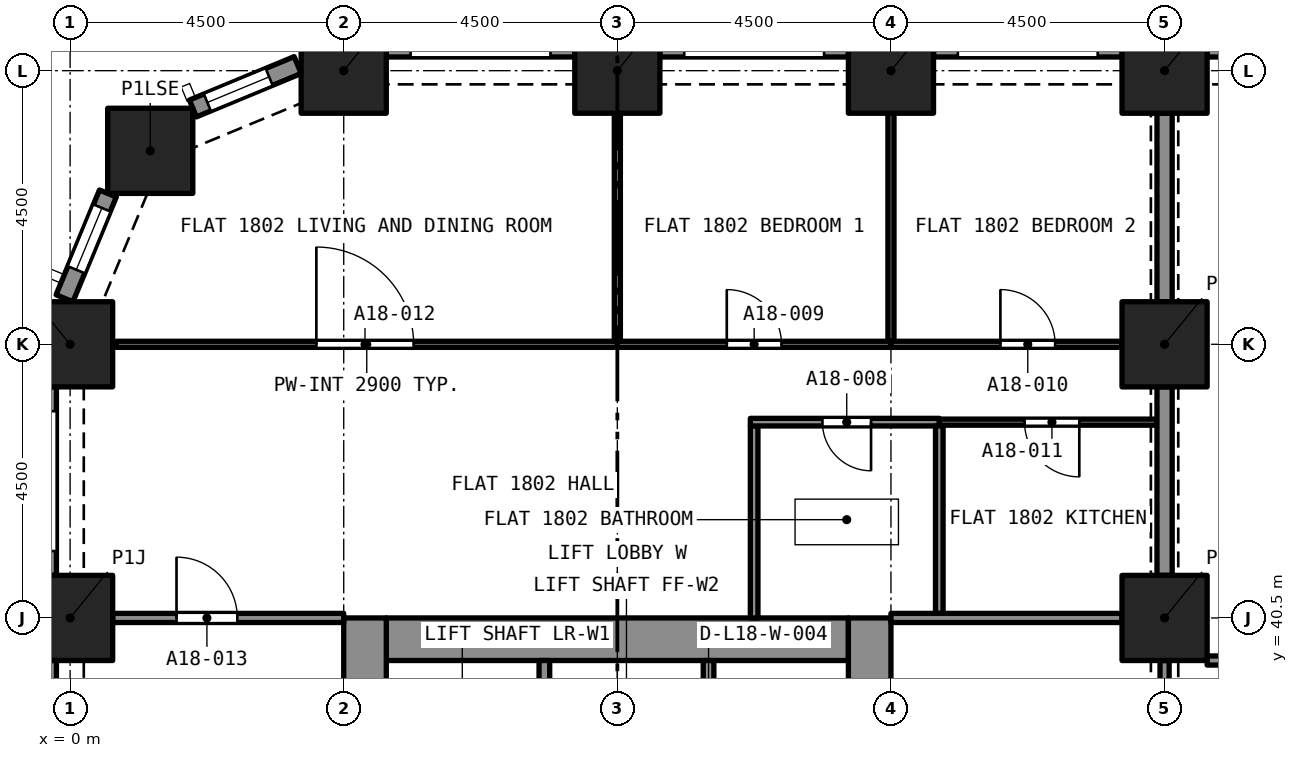
"""IFC4 building model, lengths in metres.
Left out: names, types, materials, properties, quantities, classifications, styles, units other than length and angle.
Written with IfcOpenShell. Run it as: python <this file> out.ifc"""

import sys

from ifc_helpers import new_model, si_unit, direction, frame, frame_2d, origin, origin_2d, place, context, subcontext, project, spatial, rectangle, extrude, element, fill, save


model = new_model("IFC4")
c1 = context("Model", 3, precision=1e-05, world=origin(), true_north=direction((0.0, 1.0)))
c2 = subcontext(c1, "Body", "Model", "MODEL_VIEW")
j1 = project(units=[si_unit("LENGTHUNIT", "METRE"), si_unit("PLANEANGLEUNIT", "RADIAN")], contexts=[c1])
p1 = place(None, origin())
s1 = spatial("IfcSite", under=j1, at=p1, CompositionType="ELEMENT")
p2 = place(p1, origin())
s2 = spatial("IfcBuilding", under=s1, at=p2, CompositionType="ELEMENT")
p3 = place(p2, frame((0.0, 0.0, 68.8)))
s3 = spatial("IfcBuildingStorey", under=s2, at=p3, CompositionType="ELEMENT", Elevation=68.8)
for number, where, z_axis, x_axis in (
    (1, (0.0, 40.5, 0.0), (0.0, 0.0, 1.0), (1.0, 0.0, 0.0)),
    (2, (18.0, 40.5, 0.0), (0.0, 0.0, 1.0), (1.0, 0.0, 0.0)),
    (3, (0.0, 45.0, 0.0), (0.0, 0.0, 1.0), (1.0, 0.0, 0.0)),
    (4, (18.0, 45.0, 0.0), (0.0, 0.0, 1.0), (1.0, 0.0, 0.0)),
    (5, (1.318, 48.182, 0.0), (0.0, 0.0, 1.0), (1.0, 0.0, 0.0)),
    (6, (4.5, 49.5, 0.0), (0.0, 0.0, 1.0), (1.0, 0.0, 0.0)),
    (7, (9.0, 49.5, 0.0), (0.0, 0.0, 1.0), (1.0, 0.0, 0.0)),
    (8, (13.5, 49.5, 0.0), (0.0, 0.0, 1.0), (1.0, 0.0, 0.0)),
    (9, (18.0, 49.5, 0.0), (0.0, 0.0, 1.0), (1.0, 0.0, 0.0)),
):
    element("IfcColumn", number, at=place(p3, frame(where, z_axis=z_axis, x_axis=x_axis)), inside=s3, PredefinedType="COLUMN", context=c2, shape_type="SweptSolid", body=[
        extrude(rectangle(XDim=1.4, YDim=1.4, at=origin_2d()), origin(), (0.0, 0.0, 1.0), 3.2),
    ])
p4 = place(p3, frame((5.2, 40.15, 0.0), z_axis=(0.0, 0.0, 1.0), x_axis=(1.0, 0.0, 0.0)))
e10 = element("IfcWall", 10, at=p4, inside=s3, PredefinedType="SOLIDWALL", context=c2, shape_type="SweptSolid", body=[
    extrude(rectangle(XDim=7.6, YDim=0.7, at=frame_2d((3.8, 0.0))), origin(), (0.0, 0.0, 1.0), 3.2),
])
p5 = place(p3, frame((4.85, 27.0, 0.0), z_axis=(0.0, 0.0, 1.0), x_axis=(0.0, 1.0, 0.0)))
e11 = element("IfcWall", 11, at=p5, inside=s3, PredefinedType="SOLIDWALL", context=c2, shape_type="SweptSolid", body=[
    extrude(rectangle(XDim=13.5, YDim=0.7, at=frame_2d((6.75, 0.0))), origin(), (0.0, 0.0, 1.0), 3.2),
])
p6 = place(p5, frame((8.95, 0.0, 0.0)))
e12 = element("IfcOpeningElement", 12, at=p6, cuts=e11, PredefinedType="OPENING", context=c2, shape_type="SweptSolid", body=[
    extrude(rectangle(XDim=1.2, YDim=2.1, at=frame_2d((0.6, 1.05))), frame((0.0, 0.36, 0.0), z_axis=(0.0, -1.0, 0.0), x_axis=(1.0, 0.0, 0.0)), (0.0, 0.0, 1.0), 0.72),
])
p7 = place(p3, frame((13.15, 27.0, 0.0), z_axis=(0.0, 0.0, 1.0), x_axis=(0.0, 1.0, 0.0)))
e13 = element("IfcWall", 13, at=p7, inside=s3, PredefinedType="SOLIDWALL", context=c2, shape_type="SweptSolid", body=[
    extrude(rectangle(XDim=13.5, YDim=0.7, at=frame_2d((6.75, 0.0))), origin(), (0.0, 0.0, 1.0), 3.2),
])
p8 = place(p7, frame((11.1, 0.0, 0.0)))
e14 = element("IfcOpeningElement", 14, at=p8, cuts=e13, PredefinedType="OPENING", context=c2, shape_type="SweptSolid", body=[
    extrude(rectangle(XDim=1.1, YDim=2.1, at=frame_2d((0.55, 1.05))), frame((0.0, 0.36, 0.0), z_axis=(0.0, -1.0, 0.0), x_axis=(1.0, 0.0, 0.0)), (0.0, 0.0, 1.0), 0.72),
])
p9 = place(p7, frame((8.95, 0.0, 0.0)))
e15 = element("IfcOpeningElement", 15, at=p9, cuts=e13, PredefinedType="OPENING", context=c2, shape_type="SweptSolid", body=[
    extrude(rectangle(XDim=1.2, YDim=2.1, at=frame_2d((0.6, 1.05))), frame((0.0, 0.36, 0.0), z_axis=(0.0, -1.0, 0.0), x_axis=(1.0, 0.0, 0.0)), (0.0, 0.0, 1.0), 0.72),
])
p10 = place(p3, frame((18.7, 49.875, 0.0), z_axis=(0.0, 0.0, 1.0), x_axis=(1.0, 0.0, 0.0)))
e16 = element("IfcWall", 16, at=p10, inside=s3, PredefinedType="SOLIDWALL", context=c2, shape_type="SweptSolid", body=[
    extrude(rectangle(XDim=3.1, YDim=0.3, at=frame_2d((1.55, 0.0))), origin(), (0.0, 0.0, 1.0), 3.2),
])
p11 = place(p10, frame((0.4, 0.0, 0.45)))
e17 = element("IfcOpeningElement", 17, at=p11, cuts=e16, PredefinedType="OPENING", context=c2, shape_type="SweptSolid", body=[
    extrude(rectangle(XDim=2.3, YDim=1.95, at=frame_2d((1.15, 0.975))), frame((0.0, 0.16, 0.0), z_axis=(0.0, -1.0, 0.0), x_axis=(1.0, 0.0, 0.0)), (0.0, 0.0, 1.0), 0.32),
])
p12 = place(p3, frame((14.2, 49.875, 0.0), z_axis=(0.0, 0.0, 1.0), x_axis=(1.0, 0.0, 0.0)))
e18 = element("IfcWall", 18, at=p12, inside=s3, PredefinedType="SOLIDWALL", context=c2, shape_type="SweptSolid", body=[
    extrude(rectangle(XDim=3.1, YDim=0.3, at=frame_2d((1.55, 0.0))), origin(), (0.0, 0.0, 1.0), 3.2),
])
p13 = place(p12, frame((0.4, 0.0, 0.45)))
e19 = element("IfcOpeningElement", 19, at=p13, cuts=e18, PredefinedType="OPENING", context=c2, shape_type="SweptSolid", body=[
    extrude(rectangle(XDim=2.3, YDim=1.95, at=frame_2d((1.15, 0.975))), frame((0.0, 0.16, 0.0), z_axis=(0.0, -1.0, 0.0), x_axis=(1.0, 0.0, 0.0)), (0.0, 0.0, 1.0), 0.32),
])
p14 = place(p3, frame((9.7, 49.875, 0.0), z_axis=(0.0, 0.0, 1.0), x_axis=(1.0, 0.0, 0.0)))
e20 = element("IfcWall", 20, at=p14, inside=s3, PredefinedType="SOLIDWALL", context=c2, shape_type="SweptSolid", body=[
    extrude(rectangle(XDim=3.1, YDim=0.3, at=frame_2d((1.55, 0.0))), origin(), (0.0, 0.0, 1.0), 3.2),
])
p15 = place(p14, frame((0.4, 0.0, 0.45)))
e21 = element("IfcOpeningElement", 21, at=p15, cuts=e20, PredefinedType="OPENING", context=c2, shape_type="SweptSolid", body=[
    extrude(rectangle(XDim=2.3, YDim=1.95, at=frame_2d((1.15, 0.975))), frame((0.0, 0.16, 0.0), z_axis=(0.0, -1.0, 0.0), x_axis=(1.0, 0.0, 0.0)), (0.0, 0.0, 1.0), 0.32),
])
p16 = place(p3, frame((5.2, 49.875, 0.0), z_axis=(0.0, 0.0, 1.0), x_axis=(1.0, 0.0, 0.0)))
e22 = element("IfcWall", 22, at=p16, inside=s3, PredefinedType="SOLIDWALL", context=c2, shape_type="SweptSolid", body=[
    extrude(rectangle(XDim=3.1, YDim=0.3, at=frame_2d((1.55, 0.0))), origin(), (0.0, 0.0, 1.0), 3.2),
])
p17 = place(p16, frame((0.4, 0.0, 0.45)))
e23 = element("IfcOpeningElement", 23, at=p17, cuts=e22, PredefinedType="OPENING", context=c2, shape_type="SweptSolid", body=[
    extrude(rectangle(XDim=2.3, YDim=1.95, at=frame_2d((1.15, 0.975))), frame((0.0, 0.16, 0.0), z_axis=(0.0, -1.0, 0.0), x_axis=(1.0, 0.0, 0.0)), (0.0, 0.0, 1.0), 0.32),
])
p18 = place(p3, frame((2.02, 48.878, 0.0), z_axis=(0.0, 0.0, 1.0), x_axis=(0.923903565336, 0.38262540684, 0.0)))
e24 = element("IfcWall", 24, at=p18, inside=s3, PredefinedType="SOLIDWALL", context=c2, shape_type="SweptSolid", body=[
    extrude(rectangle(XDim=1.865, YDim=0.3, at=frame_2d((0.933, 0.0))), origin(), (0.0, 0.0, 1.0), 3.2),
])
p19 = place(p18, frame((0.258, 0.0, 0.45)))
e25 = element("IfcOpeningElement", 25, at=p19, cuts=e24, PredefinedType="OPENING", context=c2, shape_type="SweptSolid", body=[
    extrude(rectangle(XDim=1.1, YDim=1.95, at=frame_2d((0.55, 0.975))), frame((0.0, 0.16, 0.0), z_axis=(0.0, -1.0, 0.0), x_axis=(1.0, 0.0, 0.0)), (0.0, 0.0, 1.0), 0.32),
])
p20 = place(p3, frame((-0.092, 45.757, 0.0), z_axis=(0.0, 0.0, 1.0), x_axis=(0.382737135771, 0.923857286003, 0.0)))
e26 = element("IfcWall", 26, at=p20, inside=s3, PredefinedType="SOLIDWALL", context=c2, shape_type="SweptSolid", body=[
    extrude(rectangle(XDim=1.865, YDim=0.3, at=frame_2d((0.933, 0.0))), origin(), (0.0, 0.0, 1.0), 3.2),
])
p21 = place(p20, frame((0.508, 0.0, 0.45)))
e27 = element("IfcOpeningElement", 27, at=p21, cuts=e26, PredefinedType="OPENING", context=c2, shape_type="SweptSolid", body=[
    extrude(rectangle(XDim=1.1, YDim=1.95, at=frame_2d((0.55, 0.975))), frame((0.0, 0.16, 0.0), z_axis=(0.0, -1.0, 0.0), x_axis=(1.0, 0.0, 0.0)), (0.0, 0.0, 1.0), 0.32),
])
p22 = place(p3, frame((-0.375, 41.2, 0.0), z_axis=(0.0, 0.0, 1.0), x_axis=(0.0, 1.0, 0.0)))
e28 = element("IfcWall", 28, at=p22, inside=s3, PredefinedType="SOLIDWALL", context=c2, shape_type="SweptSolid", body=[
    extrude(rectangle(XDim=3.1, YDim=0.3, at=frame_2d((1.55, 0.0))), origin(), (0.0, 0.0, 1.0), 3.2),
])
p23 = place(p22, frame((0.4, 0.0, 0.45)))
e29 = element("IfcOpeningElement", 29, at=p23, cuts=e28, PredefinedType="OPENING", context=c2, shape_type="SweptSolid", body=[
    extrude(rectangle(XDim=2.3, YDim=1.95, at=frame_2d((1.15, 0.975))), frame((0.0, 0.16, 0.0), z_axis=(0.0, -1.0, 0.0), x_axis=(1.0, 0.0, 0.0)), (0.0, 0.0, 1.0), 0.32),
])
p24 = place(p3, frame((-0.375, 36.7, 0.0), z_axis=(0.0, 0.0, 1.0), x_axis=(0.0, 1.0, 0.0)))
e30 = element("IfcWall", 30, at=p24, inside=s3, PredefinedType="SOLIDWALL", context=c2, shape_type="SweptSolid", body=[
    extrude(rectangle(XDim=3.1, YDim=0.3, at=frame_2d((1.55, 0.0))), origin(), (0.0, 0.0, 1.0), 3.2),
])
p25 = place(p24, frame((0.4, 0.0, 0.45)))
e31 = element("IfcOpeningElement", 31, at=p25, cuts=e30, PredefinedType="OPENING", context=c2, shape_type="SweptSolid", body=[
    extrude(rectangle(XDim=2.3, YDim=1.95, at=frame_2d((1.15, 0.975))), frame((0.0, 0.16, 0.0), z_axis=(0.0, -1.0, 0.0), x_axis=(1.0, 0.0, 0.0)), (0.0, 0.0, 1.0), 0.32),
])
p26 = place(p3, frame((11.25, 40.5, 0.0), z_axis=(0.0, 0.0, 1.0), x_axis=(0.0, 1.0, 0.0)))
e32 = element("IfcWall", 32, at=p26, inside=s3, PredefinedType="PARTITIONING", context=c2, shape_type="SweptSolid", body=[
    extrude(rectangle(XDim=3.157, YDim=0.125, at=frame_2d((1.579, 0.0))), origin(), (0.0, 0.0, 1.0), 2.9),
])
p27 = place(p3, frame((14.295, 43.72, 0.0), z_axis=(0.0, 0.0, 1.0), x_axis=(-1.0, 0.0, 0.0)))
e33 = element("IfcWall", 33, at=p27, inside=s3, PredefinedType="PARTITIONING", context=c2, shape_type="SweptSolid", body=[
    extrude(rectangle(XDim=3.108, YDim=0.125, at=frame_2d((1.554, 0.0))), origin(), (0.0, 0.0, 1.0), 2.9),
])
p28 = place(p27, frame((1.123, 0.0, 0.0)))
e34 = element("IfcOpeningElement", 34, at=p28, cuts=e33, PredefinedType="OPENING", context=c2, shape_type="SweptSolid", body=[
    extrude(rectangle(XDim=0.8, YDim=2.1, at=frame_2d((0.4, 1.05))), frame((0.0, 0.073, 0.0), z_axis=(0.0, -1.0, 0.0), x_axis=(1.0, 0.0, 0.0)), (0.0, 0.0, 1.0), 0.145),
])
p29 = place(p3, frame((14.295, 40.575, 0.0), z_axis=(0.0, 0.0, 1.0), x_axis=(0.0, 1.0, 0.0)))
e35 = element("IfcWall", 35, at=p29, inside=s3, PredefinedType="PARTITIONING", context=c2, shape_type="SweptSolid", body=[
    extrude(rectangle(XDim=3.083, YDim=0.125, at=frame_2d((1.541, 0.0))), origin(), (0.0, 0.0, 1.0), 2.9),
])
p30 = place(p3, frame((13.5, 40.5, 0.0), z_axis=(0.0, 0.0, 1.0), x_axis=(1.0, 0.0, 0.0)))
e36 = element("IfcWall", 36, at=p30, inside=s3, PredefinedType="PARTITIONING", context=c2, shape_type="SweptSolid", body=[
    extrude(rectangle(XDim=3.8, YDim=0.15, at=frame_2d((1.9, 0.0))), origin(), (0.0, 0.0, 1.0), 2.9),
])
p31 = place(p3, frame((13.5, 45.05, 0.0), z_axis=(0.0, 0.0, 1.0), x_axis=(0.0, 1.0, 0.0)))
e37 = element("IfcWall", 37, at=p31, inside=s3, PredefinedType="PARTITIONING", context=c2, shape_type="SweptSolid", body=[
    extrude(rectangle(XDim=3.75, YDim=0.1, at=frame_2d((1.875, 0.0))), origin(), (0.0, 0.0, 1.0), 2.9),
])
p32 = place(p3, frame((9.0, 45.0, 0.0), z_axis=(0.0, 0.0, 1.0), x_axis=(1.0, 0.0, 0.0)))
e38 = element("IfcWall", 38, at=p32, inside=s3, PredefinedType="PARTITIONING", context=c2, shape_type="SweptSolid", body=[
    extrude(rectangle(XDim=4.5, YDim=0.1, at=frame_2d((2.25, 0.0))), origin(), (0.0, 0.0, 1.0), 2.9),
])
p33 = place(p32, frame((1.8, 0.0, 0.0)))
e39 = element("IfcOpeningElement", 39, at=p33, cuts=e38, PredefinedType="OPENING", context=c2, shape_type="SweptSolid", body=[
    extrude(rectangle(XDim=0.9, YDim=2.1, at=frame_2d((0.45, 1.05))), frame((0.0, 0.06, 0.0), z_axis=(0.0, -1.0, 0.0), x_axis=(1.0, 0.0, 0.0)), (0.0, 0.0, 1.0), 0.12),
])
p34 = place(p3, frame((9.0, 45.05, 0.0), z_axis=(0.0, 0.0, 1.0), x_axis=(0.0, 1.0, 0.0)))
e40 = element("IfcWall", 40, at=p34, inside=s3, PredefinedType="PARTITIONING", context=c2, shape_type="SweptSolid", body=[
    extrude(rectangle(XDim=3.75, YDim=0.1, at=frame_2d((1.875, 0.0))), origin(), (0.0, 0.0, 1.0), 2.9),
])
p35 = place(p3, frame((13.5, 45.0, 0.0), z_axis=(0.0, 0.0, 1.0), x_axis=(1.0, 0.0, 0.0)))
e41 = element("IfcWall", 41, at=p35, inside=s3, PredefinedType="PARTITIONING", context=c2, shape_type="SweptSolid", body=[
    extrude(rectangle(XDim=3.8, YDim=0.1, at=frame_2d((1.9, 0.0))), origin(), (0.0, 0.0, 1.0), 2.9),
])
p36 = place(p35, frame((1.8, 0.0, 0.0)))
e42 = element("IfcOpeningElement", 42, at=p36, cuts=e41, PredefinedType="OPENING", context=c2, shape_type="SweptSolid", body=[
    extrude(rectangle(XDim=0.9, YDim=2.1, at=frame_2d((0.45, 1.05))), frame((0.0, 0.06, 0.0), z_axis=(0.0, -1.0, 0.0), x_axis=(1.0, 0.0, 0.0)), (0.0, 0.0, 1.0), 0.12),
])
p37 = place(p3, frame((18.0, 45.7, 0.0), z_axis=(0.0, 0.0, 1.0), x_axis=(0.0, 1.0, 0.0)))
e43 = element("IfcWall", 43, at=p37, inside=s3, PredefinedType="PARTITIONING", context=c2, shape_type="SweptSolid", body=[
    extrude(rectangle(XDim=3.1, YDim=0.25, at=frame_2d((1.55, 0.0))), origin(), (0.0, 0.0, 1.0), 2.38),
])
p38 = place(p3, frame((17.875, 43.72, 0.0), z_axis=(0.0, 0.0, 1.0), x_axis=(-1.0, 0.0, 0.0)))
e44 = element("IfcWall", 44, at=p38, inside=s3, PredefinedType="PARTITIONING", context=c2, shape_type="SweptSolid", body=[
    extrude(rectangle(XDim=3.58, YDim=0.1, at=frame_2d((1.79, 0.0))), origin(), (0.0, 0.0, 1.0), 2.9),
])
p39 = place(p38, frame((1.277, 0.0, 0.0)))
e45 = element("IfcOpeningElement", 45, at=p39, cuts=e44, PredefinedType="OPENING", context=c2, shape_type="SweptSolid", body=[
    extrude(rectangle(XDim=0.9, YDim=2.1, at=frame_2d((0.45, 1.05))), frame((0.0, 0.06, 0.0), z_axis=(0.0, -1.0, 0.0), x_axis=(1.0, 0.0, 0.0)), (0.0, 0.0, 1.0), 0.12),
])
p40 = place(p3, frame((0.758, 45.0, 0.0), z_axis=(0.0, 0.0, 1.0), x_axis=(1.0, 0.0, 0.0)))
e46 = element("IfcWall", 46, at=p40, inside=s3, PredefinedType="PARTITIONING", context=c2, shape_type="SweptSolid", body=[
    extrude(rectangle(XDim=8.242, YDim=0.1, at=frame_2d((4.121, 0.0))), origin(), (0.0, 0.0, 1.0), 2.9),
])
p41 = place(p40, frame((3.292, 0.0, 0.0)))
e47 = element("IfcOpeningElement", 47, at=p41, cuts=e46, PredefinedType="OPENING", context=c2, shape_type="SweptSolid", body=[
    extrude(rectangle(XDim=1.6, YDim=2.1, at=frame_2d((0.8, 1.05))), frame((0.0, 0.06, 0.0), z_axis=(0.0, -1.0, 0.0), x_axis=(1.0, 0.0, 0.0)), (0.0, 0.0, 1.0), 0.12),
])
p42 = place(p3, frame((0.7, 40.5, 0.0), z_axis=(0.0, 0.0, 1.0), x_axis=(1.0, 0.0, 0.0)))
e48 = element("IfcWall", 48, at=p42, inside=s3, PredefinedType="PARTITIONING", context=c2, shape_type="SweptSolid", body=[
    extrude(rectangle(XDim=3.8, YDim=0.15, at=frame_2d((1.9, 0.0))), origin(), (0.0, 0.0, 1.0), 2.9),
])
p43 = place(p42, frame((1.05, 0.0, 0.0)))
e49 = element("IfcOpeningElement", 49, at=p43, cuts=e48, PredefinedType="OPENING", context=c2, shape_type="SweptSolid", body=[
    extrude(rectangle(XDim=1.0, YDim=2.1, at=frame_2d((0.5, 1.05))), frame((0.0, 0.085, 0.0), z_axis=(0.0, -1.0, 0.0), x_axis=(1.0, 0.0, 0.0)), (0.0, 0.0, 1.0), 0.17),
])
p44 = place(p3, frame((18.0, 41.2, 0.0), z_axis=(0.0, 0.0, 1.0), x_axis=(0.0, 1.0, 0.0)))
e50 = element("IfcWall", 50, at=p44, inside=s3, PredefinedType="PARTITIONING", context=c2, shape_type="SweptSolid", body=[
    extrude(rectangle(XDim=3.1, YDim=0.25, at=frame_2d((1.55, 0.0))), origin(), (0.0, 0.0, 1.0), 2.38),
])
p45 = place(p3, frame((18.7, 39.8, 0.0), z_axis=(0.0, 0.0, 1.0), x_axis=(1.0, 0.0, 0.0)))
e51 = element("IfcWall", 51, at=p45, inside=s3, PredefinedType="PARTITIONING", context=c2, shape_type="SweptSolid", body=[
    extrude(rectangle(XDim=12.1, YDim=0.15, at=frame_2d((6.05, 0.0))), origin(), (0.0, 0.0, 1.0), 2.75),
])
p46 = place(p45, frame((5.55, 0.0, 0.0)))
e52 = element("IfcOpeningElement", 52, at=p46, cuts=e51, PredefinedType="OPENING", context=c2, shape_type="SweptSolid", body=[
    extrude(rectangle(XDim=1.0, YDim=2.1, at=frame_2d((0.5, 1.05))), frame((0.0, 0.085, 0.0), z_axis=(0.0, -1.0, 0.0), x_axis=(1.0, 0.0, 0.0)), (0.0, 0.0, 1.0), 0.17),
])
p47 = place(p3, frame((18.0, 39.8, 0.0), z_axis=(0.0, 0.0, 1.0), x_axis=(0.0, -1.0, 0.0)))
e53 = element("IfcWall", 53, at=p47, inside=s3, PredefinedType="PARTITIONING", context=c2, shape_type="SweptSolid", body=[
    extrude(rectangle(XDim=3.1, YDim=0.15, at=frame_2d((1.55, 0.0))), origin(), (0.0, 0.0, 1.0), 2.38),
])
p48 = place(p47, frame((0.95, 0.0, 0.0)))
e54 = element("IfcOpeningElement", 54, at=p48, cuts=e53, PredefinedType="OPENING", context=c2, shape_type="SweptSolid", body=[
    extrude(rectangle(XDim=1.2, YDim=2.1, at=frame_2d((0.6, 1.05))), frame((0.0, 0.085, 0.0), z_axis=(0.0, -1.0, 0.0), x_axis=(1.0, 0.0, 0.0)), (0.0, 0.0, 1.0), 0.17),
])
p49 = place(p3, frame((7.8, 37.5, 0.0), z_axis=(0.0, 0.0, 1.0), x_axis=(0.0, 1.0, 0.0)))
e55 = element("IfcWall", 55, at=p49, inside=s3, PredefinedType="SOLIDWALL", context=c2, shape_type="SweptSolid", body=[
    extrude(rectangle(XDim=2.3, YDim=0.175, at=frame_2d((1.15, 0.0))), origin(), (0.0, 0.0, 1.0), 2.9),
])
p50 = place(p3, frame((10.5, 37.5, 0.0), z_axis=(0.0, 0.0, 1.0), x_axis=(0.0, 1.0, 0.0)))
e56 = element("IfcWall", 56, at=p50, inside=s3, PredefinedType="SOLIDWALL", context=c2, shape_type="SweptSolid", body=[
    extrude(rectangle(XDim=2.3, YDim=0.175, at=frame_2d((1.15, 0.0))), origin(), (0.0, 0.0, 1.0), 2.9),
])
p51 = place(p50, frame((0.65, 0.0, 0.0)))
e57 = element("IfcOpeningElement", 57, at=p51, cuts=e56, PredefinedType="OPENING", context=c2, shape_type="SweptSolid", body=[
    extrude(rectangle(XDim=1.0, YDim=2.1, at=frame_2d((0.5, 1.05))), frame((0.0, 0.097, 0.0), z_axis=(0.0, -1.0, 0.0), x_axis=(1.0, 0.0, 0.0)), (0.0, 0.0, 1.0), 0.195),
])
p52 = place(p19, origin())
e58 = element("IfcWindow", 58, at=p52, inside=s3, PartitioningType="SINGLE_PANEL", PredefinedType="WINDOW", context=c2, shape_type="SweptSolid", body=[
    extrude(rectangle(XDim=1.1, YDim=1.95, at=frame_2d((0.55, 0.975))), frame((0.0, 0.03, 0.0), z_axis=(0.0, -1.0, 0.0), x_axis=(1.0, 0.0, 0.0)), (0.0, 0.0, 1.0), 0.06),
])
fill(e25, e58)
p53 = place(p21, origin())
e59 = element("IfcWindow", 59, at=p53, inside=s3, PartitioningType="SINGLE_PANEL", PredefinedType="WINDOW", context=c2, shape_type="SweptSolid", body=[
    extrude(rectangle(XDim=1.1, YDim=1.95, at=frame_2d((0.55, 0.975))), frame((0.0, 0.03, 0.0), z_axis=(0.0, -1.0, 0.0), x_axis=(1.0, 0.0, 0.0)), (0.0, 0.0, 1.0), 0.06),
])
fill(e27, e59)
p54 = place(p28, origin())
e60 = element("IfcDoor", 60, at=p54, inside=s3, OperationType="SINGLE_SWING_LEFT", PredefinedType="DOOR", context=c2, shape_type="SweptSolid", body=[
    extrude(rectangle(XDim=0.8, YDim=2.1, at=frame_2d((0.4, 1.05))), frame((0.0, 0.025, 0.0), z_axis=(0.0, -1.0, 0.0), x_axis=(1.0, 0.0, 0.0)), (0.0, 0.0, 1.0), 0.05),
])
fill(e34, e60)
p55 = place(p33, origin())
e61 = element("IfcDoor", 61, at=p55, inside=s3, OperationType="SINGLE_SWING_LEFT", PredefinedType="DOOR", context=c2, shape_type="SweptSolid", body=[
    extrude(rectangle(XDim=0.9, YDim=2.1, at=frame_2d((0.45, 1.05))), frame((0.0, 0.025, 0.0), z_axis=(0.0, -1.0, 0.0), x_axis=(1.0, 0.0, 0.0)), (0.0, 0.0, 1.0), 0.05),
])
fill(e39, e61)
p56 = place(p36, origin())
e62 = element("IfcDoor", 62, at=p56, inside=s3, OperationType="SINGLE_SWING_RIGHT", PredefinedType="DOOR", context=c2, shape_type="SweptSolid", body=[
    extrude(rectangle(XDim=0.9, YDim=2.1, at=frame_2d((0.45, 1.05))), frame((0.0, 0.025, 0.0), z_axis=(0.0, -1.0, 0.0), x_axis=(1.0, 0.0, 0.0)), (0.0, 0.0, 1.0), 0.05),
])
fill(e42, e62)
p57 = place(p39, origin())
e63 = element("IfcDoor", 63, at=p57, inside=s3, OperationType="SINGLE_SWING_LEFT", PredefinedType="DOOR", context=c2, shape_type="SweptSolid", body=[
    extrude(rectangle(XDim=0.9, YDim=2.1, at=frame_2d((0.45, 1.05))), frame((0.0, 0.025, 0.0), z_axis=(0.0, -1.0, 0.0), x_axis=(1.0, 0.0, 0.0)), (0.0, 0.0, 1.0), 0.05),
])
fill(e45, e63)
p58 = place(p41, origin())
e64 = element("IfcDoor", 64, at=p58, inside=s3, OperationType="SINGLE_SWING_LEFT", PredefinedType="DOOR", context=c2, shape_type="SweptSolid", body=[
    extrude(rectangle(XDim=1.6, YDim=2.1, at=frame_2d((0.8, 1.05))), frame((0.0, 0.025, 0.0), z_axis=(0.0, -1.0, 0.0), x_axis=(1.0, 0.0, 0.0)), (0.0, 0.0, 1.0), 0.05),
])
fill(e47, e64)
p59 = place(p43, origin())
e65 = element("IfcDoor", 65, at=p59, inside=s3, OperationType="SINGLE_SWING_LEFT", PredefinedType="DOOR", context=c2, shape_type="SweptSolid", body=[
    extrude(rectangle(XDim=1.0, YDim=2.1, at=frame_2d((0.5, 1.05))), frame((0.0, 0.025, 0.0), z_axis=(0.0, -1.0, 0.0), x_axis=(1.0, 0.0, 0.0)), (0.0, 0.0, 1.0), 0.05),
])
fill(e49, e65)
save(model, sys.argv[1])
